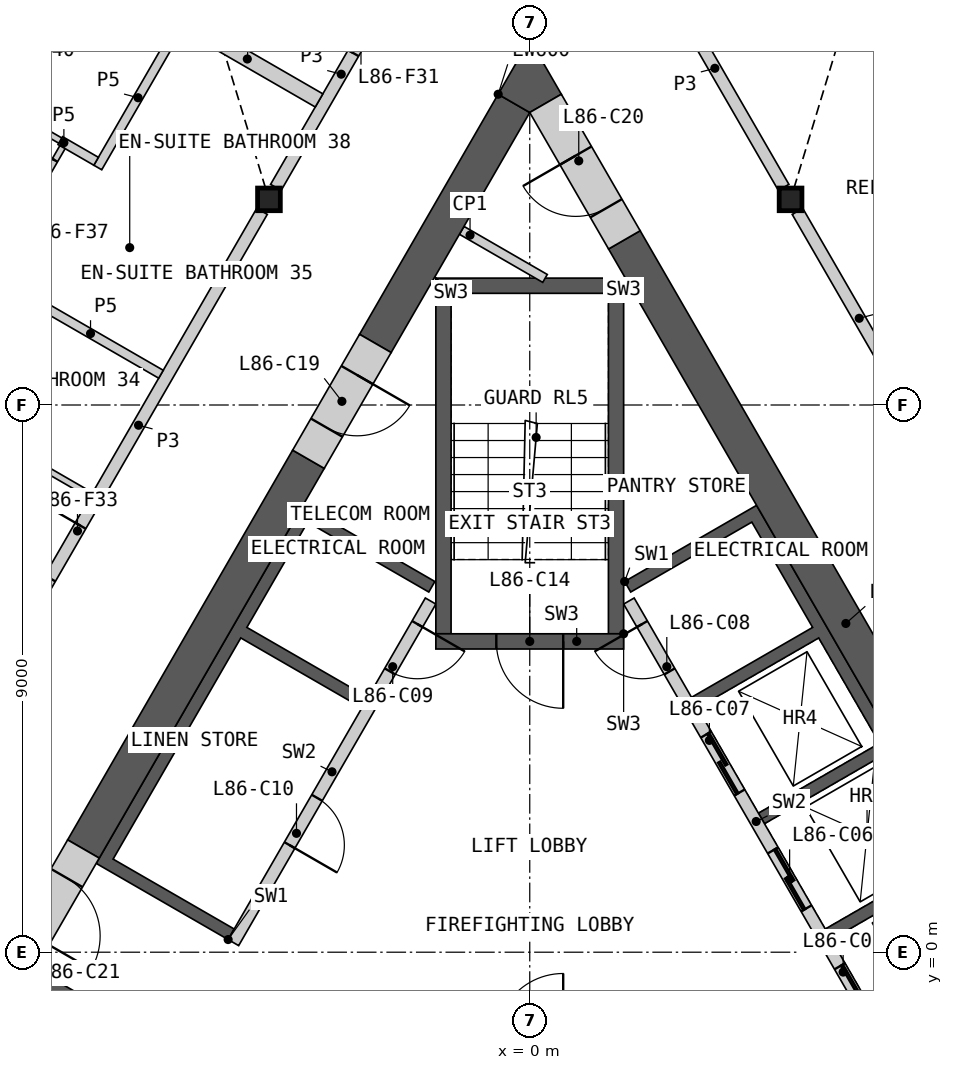
"""IFC4 building model, lengths in metres.
Left out: names, types, materials, properties, quantities, classifications, styles, units other than length and angle.
Written with IfcOpenShell. Run it as: python <this file> out.ifc"""

import sys

from ifc_helpers import new_model, si_unit, direction, frame, frame_2d, origin, origin_2d, place, context, subcontext, project, spatial, polyline, rectangle, i_section, outline, extrude, element, fill, save


model = new_model("IFC4")
c1 = context("Model", 3, precision=1e-05, world=origin(), true_north=direction((0.0, 1.0)))
c2 = subcontext(c1, "Body", "Model", "MODEL_VIEW")
j1 = project(units=[si_unit("LENGTHUNIT", "METRE"), si_unit("PLANEANGLEUNIT", "RADIAN")], contexts=[c1])
p1 = place(None, origin())
s1 = spatial("IfcSite", under=j1, at=p1, CompositionType="ELEMENT")
p2 = place(p1, origin())
s2 = spatial("IfcBuilding", under=s1, at=p2, CompositionType="ELEMENT")
p3 = place(p2, frame((0.0, 0.0, 381.4)))
s3 = spatial("IfcBuildingStorey", under=s2, at=p3, CompositionType="ELEMENT", Elevation=381.4)
for number, where, z_axis, x_axis in (
    (1, (-4.289, 12.382, 0.0), (0.0, 0.0, 1.0), (1.0, 0.0, 0.0)),
    (2, (4.289, 12.382, 0.0), (0.0, 0.0, 1.0), (1.0, 0.0, 0.0)),
):
    element("IfcColumn", number, at=place(p3, frame(where, z_axis=z_axis, x_axis=x_axis)), inside=s3, PredefinedType="COLUMN", context=c2, shape_type="SweptSolid", body=[
        extrude(i_section(OverallWidth=0.374, OverallDepth=0.372, WebThickness=0.016, FlangeThickness=0.026, at=origin_2d()), origin(), (0.0, 0.0, 1.0), 3.4),
    ])
p4 = place(p3, origin())
e3 = element("IfcWall", 3, at=p4, inside=s3, PredefinedType="SHEAR", context=c2, shape_type="SweptSolid", body=[
    extrude(outline(polyline([(1.561, 6.097), (3.731, 7.35), (8.231, -0.444), (6.061, -1.697), (5.96, -1.524), (7.952, -0.374), (6.952, 1.358), (4.96, 0.208), (4.861, 0.381), (6.852, 1.531), (5.852, 3.263), (3.861, 2.113), (3.76, 2.287), (5.752, 3.437), (4.752, 5.169), (2.76, 4.019), (2.66, 4.192), (4.652, 5.342), (3.652, 7.074), (1.66, 5.924), (1.561, 6.097)])), origin(), (0.0, 0.0, 1.0), 3.1),
])
p5 = place(p3, frame((5.817, -1.476, 0.0), z_axis=(0.0, 0.0, 1.0), x_axis=(-0.500002616675, 0.866023893041, 0.0)))
e4 = element("IfcWall", 4, at=p5, inside=s3, PredefinedType="SOLIDWALL", context=c2, shape_type="SweptSolid", body=[
    extrude(rectangle(XDim=8.373, YDim=0.2, at=frame_2d((4.187, 0.0))), origin(), (0.0, 0.0, 1.0), 3.1),
])
p6 = place(p5, frame((0.337, 0.0, 0.0)))
e5 = element("IfcOpeningElement", 5, at=p6, cuts=e4, PredefinedType="OPENING", context=c2, shape_type="SweptSolid", body=[
    extrude(rectangle(XDim=1.1, YDim=2.1, at=frame_2d((0.55, 1.05))), frame((0.0, 0.11, 0.0), z_axis=(0.0, -1.0, 0.0), x_axis=(1.0, 0.0, 0.0)), (0.0, 0.0, 1.0), 0.22),
])
p7 = place(p5, frame((2.537, 0.0, 0.0)))
e6 = element("IfcOpeningElement", 6, at=p7, cuts=e4, PredefinedType="OPENING", context=c2, shape_type="SweptSolid", body=[
    extrude(rectangle(XDim=1.1, YDim=2.1, at=frame_2d((0.55, 1.05))), frame((0.0, 0.11, 0.0), z_axis=(0.0, -1.0, 0.0), x_axis=(1.0, 0.0, 0.0)), (0.0, 0.0, 1.0), 0.22),
])
p8 = place(p5, frame((4.737, 0.0, 0.0)))
e7 = element("IfcOpeningElement", 7, at=p8, cuts=e4, PredefinedType="OPENING", context=c2, shape_type="SweptSolid", body=[
    extrude(rectangle(XDim=1.1, YDim=2.1, at=frame_2d((0.55, 1.05))), frame((0.0, 0.11, 0.0), z_axis=(0.0, -1.0, 0.0), x_axis=(1.0, 0.0, 0.0)), (0.0, 0.0, 1.0), 0.22),
])
p9 = place(p5, frame((7.037, 0.0, 0.0)))
e8 = element("IfcOpeningElement", 8, at=p9, cuts=e4, PredefinedType="OPENING", context=c2, shape_type="SweptSolid", body=[
    extrude(rectangle(XDim=0.9, YDim=2.1, at=frame_2d((0.45, 1.05))), frame((0.0, 0.11, 0.0), z_axis=(0.0, -1.0, 0.0), x_axis=(1.0, 0.0, 0.0)), (0.0, 0.0, 1.0), 0.22),
])
p10 = place(p3, origin())
e9 = element("IfcWall", 9, at=p10, inside=s3, PredefinedType="SHEAR", context=c2, shape_type="SweptSolid", body=[
    extrude(outline(polyline([(-6.061, -1.697), (-8.231, -0.444), (-8.131, -0.271), (-5.96, -1.524), (-6.061, -1.697)])), origin(), (0.0, 0.0, 1.0), 3.1),
])
p11 = place(p3, origin())
e10 = element("IfcWall", 10, at=p11, inside=s3, PredefinedType="SHEAR", context=c2, shape_type="SweptSolid", body=[
    extrude(outline(polyline([(-4.96, 0.208), (-7.131, 1.461), (-3.731, 7.35), (-1.561, 6.097), (-1.66, 5.924), (-3.652, 7.074), (-4.652, 5.342), (-2.66, 4.192), (-2.76, 4.019), (-4.752, 5.169), (-6.852, 1.531), (-4.861, 0.381), (-4.96, 0.208)])), origin(), (0.0, 0.0, 1.0), 3.1),
])
p12 = place(p3, frame((-1.631, 5.776, 0.0), z_axis=(0.0, 0.0, 1.0), x_axis=(-0.499992876559, -0.866029516466, 0.0)))
e11 = element("IfcWall", 11, at=p12, inside=s3, PredefinedType="SOLIDWALL", context=c2, shape_type="SweptSolid", body=[
    extrude(rectangle(XDim=6.486, YDim=0.2, at=frame_2d((3.243, 0.0))), origin(), (0.0, 0.0, 1.0), 3.1),
])
p13 = place(p12, frame((0.437, 0.0, 0.0)))
e12 = element("IfcOpeningElement", 12, at=p13, cuts=e11, PredefinedType="OPENING", context=c2, shape_type="SweptSolid", body=[
    extrude(rectangle(XDim=0.9, YDim=2.1, at=frame_2d((0.45, 1.05))), frame((0.0, 0.11, 0.0), z_axis=(0.0, -1.0, 0.0), x_axis=(1.0, 0.0, 0.0)), (0.0, 0.0, 1.0), 0.22),
])
p14 = place(p12, frame((3.737, 0.0, 0.0)))
e13 = element("IfcOpeningElement", 13, at=p14, cuts=e11, PredefinedType="OPENING", context=c2, shape_type="SweptSolid", body=[
    extrude(rectangle(XDim=0.9, YDim=2.1, at=frame_2d((0.45, 1.05))), frame((0.0, 0.11, 0.0), z_axis=(0.0, -1.0, 0.0), x_axis=(1.0, 0.0, 0.0)), (0.0, 0.0, 1.0), 0.22),
])
p15 = place(p3, origin())
e14 = element("IfcWall", 14, at=p15, inside=s3, PredefinedType="SHEAR", context=c2, shape_type="SweptSolid", body=[
    extrude(outline(polyline([(1.544, 5.237), (1.544, 11.087), (1.294, 10.837), (1.294, 5.237), (1.544, 5.237)])), origin(), (0.0, 0.0, 1.0), 3.1),
])
p16 = place(p3, origin())
e15 = element("IfcWall", 15, at=p16, inside=s3, PredefinedType="SHEAR", context=c2, shape_type="SweptSolid", body=[
    extrude(outline(polyline([(1.544, 11.087), (-1.544, 11.087), (-1.294, 10.837), (1.294, 10.837), (1.544, 11.087)])), origin(), (0.0, 0.0, 1.0), 3.1),
])
p17 = place(p3, origin())
e16 = element("IfcWall", 16, at=p17, inside=s3, PredefinedType="SHEAR", context=c2, shape_type="SweptSolid", body=[
    extrude(outline(polyline([(-1.294, 10.837), (-1.544, 11.087), (-1.544, 5.237), (-1.294, 5.237), (-1.294, 10.837)])), origin(), (0.0, 0.0, 1.0), 3.1),
])
p18 = place(p3, frame((1.544, 5.112, 0.0), z_axis=(0.0, 0.0, 1.0), x_axis=(-1.0, 0.0, 0.0)))
e17 = element("IfcWall", 17, at=p18, inside=s3, PredefinedType="SHEAR", context=c2, shape_type="SweptSolid", body=[
    extrude(rectangle(XDim=3.088, YDim=0.25, at=frame_2d((1.544, 0.0))), origin(), (0.0, 0.0, 1.0), 3.1),
])
p19 = place(p18, frame((0.994, 0.0, 0.0)))
e18 = element("IfcOpeningElement", 18, at=p19, cuts=e17, PredefinedType="OPENING", context=c2, shape_type="SweptSolid", body=[
    extrude(rectangle(XDim=1.1, YDim=2.1, at=frame_2d((0.55, 1.05))), frame((0.0, 0.135, 0.0), z_axis=(0.0, -1.0, 0.0), x_axis=(1.0, 0.0, 0.0)), (0.0, 0.0, 1.0), 0.27),
])
p20 = place(p3, frame((-1.119, 11.873, 0.0), z_axis=(0.0, 0.0, 1.0), x_axis=(0.865992812752, -0.500056445075, 0.0)))
e19 = element("IfcWall", 19, at=p20, inside=s3, PredefinedType="PARTITIONING", context=c2, shape_type="SweptSolid", body=[
    extrude(rectangle(XDim=1.582, YDim=0.15, at=frame_2d((0.791, 0.0))), origin(), (0.0, 0.0, 1.0), 3.1),
])
p21 = place(p3, frame((8.841, -0.902, 0.0), z_axis=(0.0, 0.0, 1.0), x_axis=(-0.499995618375, 0.866027933502, 0.0)))
e20 = element("IfcWall", 20, at=p21, inside=s3, PredefinedType="SHEAR", context=c2, shape_type="SweptSolid", body=[
    extrude(rectangle(XDim=14.571, YDim=0.6, at=frame_2d((7.285, 0.0))), origin(), (0.0, 0.0, 1.0), 3.1),
])
p22 = place(p3, frame((-3.639, 8.107, 0.0), z_axis=(0.0, 0.0, 1.0), x_axis=(-0.49999180351, -0.866030135978, 0.0)))
e21 = element("IfcWall", 21, at=p22, inside=s3, PredefinedType="SHEAR", context=c2, shape_type="SweptSolid", body=[
    extrude(rectangle(XDim=7.401, YDim=0.6, at=frame_2d((3.701, 0.0))), origin(), (0.0, 0.0, 1.0), 3.1),
])
p23 = place(p3, frame((-0.26, 13.961, 0.0), z_axis=(0.0, 0.0, 1.0), x_axis=(-0.499980485389, -0.866036670257, 0.0)))
e22 = element("IfcWall", 22, at=p23, inside=s3, PredefinedType="SHEAR", context=c2, shape_type="SweptSolid", body=[
    extrude(rectangle(XDim=4.559, YDim=0.6, at=frame_2d((2.28, 0.0))), origin(), (0.0, 0.0, 1.0), 3.1),
])
p24 = place(p3, origin())
e23 = element("IfcWall", 23, at=p24, inside=s3, PredefinedType="SHEAR", context=c2, shape_type="SweptSolid", body=[
    extrude(outline(polyline([(-0.52, 14.111), (0.0, 15.011), (0.52, 14.111), (0.0, 13.811), (-0.52, 14.111)])), origin(), (0.0, 0.0, 1.0), 3.1),
])
p25 = place(p3, frame((-2.539, 10.013, 0.0), z_axis=(0.0, 0.0, 1.0), x_axis=(-0.50002983664, -0.866008176907, 0.0)))
e24 = element("IfcWall", 24, at=p25, inside=s3, PredefinedType="SHEAR", context=c2, shape_type="SweptSolid", body=[
    extrude(rectangle(XDim=2.2, YDim=0.6, at=frame_2d((1.1, 0.0))), origin(), (0.0, 0.0, 1.0), 3.1),
])
p26 = place(p25, frame((0.6, 0.0, 0.0)))
e25 = element("IfcOpeningElement", 25, at=p26, cuts=e24, PredefinedType="OPENING", context=c2, shape_type="SweptSolid", body=[
    extrude(rectangle(XDim=1.0, YDim=2.1, at=frame_2d((0.5, 1.05))), frame((0.0, 0.31, 0.0), z_axis=(0.0, -1.0, 0.0), x_axis=(1.0, 0.0, 0.0)), (0.0, 0.0, 1.0), 0.62),
])
p27 = place(p3, frame((1.556, 11.716, 0.0), z_axis=(0.0, 0.0, 1.0), x_axis=(-0.500018667571, 0.866014625789, 0.0)))
e26 = element("IfcWall", 26, at=p27, inside=s3, PredefinedType="SHEAR", context=c2, shape_type="SweptSolid", body=[
    extrude(rectangle(XDim=2.592, YDim=0.6, at=frame_2d((1.296, 0.0))), origin(), (0.0, 0.0, 1.0), 3.1),
])
p28 = place(p27, frame((0.6, 0.0, 0.0)))
e27 = element("IfcOpeningElement", 27, at=p28, cuts=e26, PredefinedType="OPENING", context=c2, shape_type="SweptSolid", body=[
    extrude(rectangle(XDim=1.0, YDim=2.1, at=frame_2d((0.5, 1.05))), frame((0.0, 0.31, 0.0), z_axis=(0.0, -1.0, 0.0), x_axis=(1.0, 0.0, 0.0)), (0.0, 0.0, 1.0), 0.62),
])
p29 = place(p3, frame((-7.34, 1.698, 0.0), z_axis=(0.0, 0.0, 1.0), x_axis=(-0.50002983664, -0.866008176907, 0.0)))
e28 = element("IfcWall", 28, at=p29, inside=s3, PredefinedType="SHEAR", context=c2, shape_type="SweptSolid", body=[
    extrude(rectangle(XDim=2.2, YDim=0.6, at=frame_2d((1.1, 0.0))), origin(), (0.0, 0.0, 1.0), 3.1),
])
p30 = place(p29, frame((0.55, 0.0, 0.0)))
e29 = element("IfcOpeningElement", 29, at=p30, cuts=e28, PredefinedType="OPENING", context=c2, shape_type="SweptSolid", body=[
    extrude(rectangle(XDim=1.1, YDim=2.1, at=frame_2d((0.55, 1.05))), frame((0.0, 0.31, 0.0), z_axis=(0.0, -1.0, 0.0), x_axis=(1.0, 0.0, 0.0)), (0.0, 0.0, 1.0), 0.62),
])
p31 = place(p3, frame((4.403, 12.185, 0.0), z_axis=(0.0, 0.0, 1.0), x_axis=(0.499992155518, -0.866029932751, 0.0)))
e30 = element("IfcWall", 30, at=p31, inside=s3, PredefinedType="PARTITIONING", context=c2, shape_type="SweptSolid", body=[
    extrude(rectangle(XDim=8.123, YDim=0.2, at=frame_2d((4.062, 0.0))), origin(), (0.0, 0.0, 1.0), 3.1),
])
p32 = place(p31, frame((3.587, 0.0, 0.0)))
e31 = element("IfcOpeningElement", 31, at=p32, cuts=e30, PredefinedType="OPENING", context=c2, shape_type="SweptSolid", body=[
    extrude(rectangle(XDim=0.95, YDim=2.1, at=frame_2d((0.475, 1.05))), frame((0.0, 0.11, 0.0), z_axis=(0.0, -1.0, 0.0), x_axis=(1.0, 0.0, 0.0)), (0.0, 0.0, 1.0), 0.22),
])
p33 = place(p3, frame((-8.465, 5.15, 0.0), z_axis=(0.0, 0.0, 1.0), x_axis=(0.499992155518, 0.866029932751, 0.0)))
e32 = element("IfcWall", 32, at=p33, inside=s3, PredefinedType="PARTITIONING", context=c2, shape_type="SweptSolid", body=[
    extrude(rectangle(XDim=8.123, YDim=0.2, at=frame_2d((4.062, 0.0))), origin(), (0.0, 0.0, 1.0), 3.1),
])
p34 = place(p33, frame((1.153, 0.0, 0.0)))
e33 = element("IfcOpeningElement", 33, at=p34, cuts=e32, PredefinedType="OPENING", context=c2, shape_type="SweptSolid", body=[
    extrude(rectangle(XDim=1.0, YDim=2.1, at=frame_2d((0.5, 1.05))), frame((0.0, 0.11, 0.0), z_axis=(0.0, -1.0, 0.0), x_axis=(1.0, 0.0, 0.0)), (0.0, 0.0, 1.0), 0.22),
])
p35 = place(p3, frame((1.913, 16.498, 0.0), z_axis=(0.0, 0.0, 1.0), x_axis=(0.499974648164, -0.866040040179, 0.0)))
e34 = element("IfcWall", 34, at=p35, inside=s3, PredefinedType="PARTITIONING", context=c2, shape_type="SweptSolid", body=[
    extrude(rectangle(XDim=4.525, YDim=0.2, at=frame_2d((2.263, 0.0))), origin(), (0.0, 0.0, 1.0), 3.1),
])
p36 = place(p3, frame((-4.176, 12.579, 0.0), z_axis=(0.0, 0.0, 1.0), x_axis=(0.500004215162, 0.866022970146, 0.0)))
e35 = element("IfcWall", 35, at=p36, inside=s3, PredefinedType="PARTITIONING", context=c2, shape_type="SweptSolid", body=[
    extrude(rectangle(XDim=4.3, YDim=0.2, at=frame_2d((2.15, 0.0))), origin(), (0.0, 0.0, 1.0), 3.1),
])
p37 = place(p36, frame((2.55, 0.0, 0.0)))
e36 = element("IfcOpeningElement", 36, at=p37, cuts=e35, PredefinedType="OPENING", context=c2, shape_type="SweptSolid", body=[
    extrude(rectangle(XDim=1.0, YDim=2.1, at=frame_2d((0.5, 1.05))), frame((0.0, 0.11, 0.0), z_axis=(0.0, -1.0, 0.0), x_axis=(1.0, 0.0, 0.0)), (0.0, 0.0, 1.0), 0.22),
])
p38 = place(p3, frame((-5.825, 15.372, 0.0), z_axis=(0.0, 0.0, 1.0), x_axis=(0.866051307416, -0.49995513091, 0.0)))
e37 = element("IfcWall", 37, at=p38, inside=s3, PredefinedType="PARTITIONING", context=c2, shape_type="SweptSolid", body=[
    extrude(rectangle(XDim=2.725, YDim=0.25, at=frame_2d((1.362, 0.0))), origin(), (0.0, 0.0, 1.0), 2.33),
])
p39 = place(p3, frame((3.926, 19.811, 0.0), z_axis=(0.0, 0.0, 1.0), x_axis=(0.500001082559, -0.866024778768, 0.0)))
e38 = element("IfcWall", 38, at=p39, inside=s3, PredefinedType="PARTITIONING", context=c2, shape_type="SweptSolid", body=[
    extrude(rectangle(XDim=15.094, YDim=0.2, at=frame_2d((7.547, 0.0))), origin(), (0.0, 0.0, 1.0), 2.33),
])
p40 = place(p39, frame((3.761, 0.0, 0.0)))
e39 = element("IfcOpeningElement", 39, at=p40, cuts=e38, PredefinedType="OPENING", context=c2, shape_type="SweptSolid", body=[
    extrude(rectangle(XDim=0.95, YDim=2.1, at=frame_2d((0.475, 1.05))), frame((0.0, 0.11, 0.0), z_axis=(0.0, -1.0, 0.0), x_axis=(1.0, 0.0, 0.0)), (0.0, 0.0, 1.0), 0.22),
])
p41 = place(p3, frame((-8.382, 10.844, 0.0), z_axis=(0.0, 0.0, 1.0), x_axis=(0.866021425885, -0.500006889861, 0.0)))
e40 = element("IfcWall", 40, at=p41, inside=s3, PredefinedType="PLUMBINGWALL", context=c2, shape_type="SweptSolid", body=[
    extrude(rectangle(XDim=2.675, YDim=0.15, at=frame_2d((1.337, 0.0))), origin(), (0.0, 0.0, 1.0), 2.33),
])
p42 = place(p3, frame((-7.104, 12.906, 0.0), z_axis=(0.0, 0.0, 1.0), x_axis=(0.499993606316, 0.866029095148, 0.0)))
e41 = element("IfcWall", 41, at=p42, inside=s3, PredefinedType="PLUMBINGWALL", context=c2, shape_type="SweptSolid", body=[
    extrude(rectangle(XDim=2.65, YDim=0.15, at=frame_2d((1.325, 0.0))), origin(), (0.0, 0.0, 1.0), 2.33),
])
p43 = place(p3, frame((-7.72, 13.349, 0.0), z_axis=(0.0, 0.0, 1.0), x_axis=(0.866113839764, -0.499846793097, 0.0)))
e42 = element("IfcWall", 42, at=p43, inside=s3, PredefinedType="PLUMBINGWALL", context=c2, shape_type="SweptSolid", body=[
    extrude(rectangle(XDim=0.68, YDim=0.15, at=frame_2d((0.34, 0.0))), origin(), (0.0, 0.0, 1.0), 2.33),
])
p44 = place(p3, frame((-9.517, 14.328, 0.0), z_axis=(0.0, 0.0, 1.0), x_axis=(0.499996545922, 0.866027397988, 0.0)))
e43 = element("IfcWall", 43, at=p44, inside=s3, PredefinedType="PARTITIONING", context=c2, shape_type="SweptSolid", body=[
    extrude(rectangle(XDim=5.5, YDim=0.1, at=frame_2d((2.75, 0.0))), origin(), (0.0, 0.0, 1.0), 2.33),
])
p45 = place(p44, frame((4.3, 0.0, 0.0)))
e44 = element("IfcOpeningElement", 44, at=p45, cuts=e43, PredefinedType="OPENING", context=c2, shape_type="SweptSolid", body=[
    extrude(rectangle(XDim=0.95, YDim=2.1, at=frame_2d((0.475, 1.05))), frame((0.0, 0.06, 0.0), z_axis=(0.0, -1.0, 0.0), x_axis=(1.0, 0.0, 0.0)), (0.0, 0.0, 1.0), 0.12),
])
p46 = place(p44, frame((0.25, 0.0, 0.0)))
e45 = element("IfcOpeningElement", 45, at=p46, cuts=e43, PredefinedType="OPENING", context=c2, shape_type="SweptSolid", body=[
    extrude(rectangle(XDim=0.95, YDim=2.1, at=frame_2d((0.475, 1.05))), frame((0.0, 0.06, 0.0), z_axis=(0.0, -1.0, 0.0), x_axis=(1.0, 0.0, 0.0)), (0.0, 0.0, 1.0), 0.12),
])
p47 = place(p3, frame((-9.51, 8.839, 0.0), z_axis=(0.0, 0.0, 1.0), x_axis=(0.866029095148, -0.499993606316, 0.0)))
e46 = element("IfcWall", 46, at=p47, inside=s3, PredefinedType="PARTITIONING", context=c2, shape_type="SweptSolid", body=[
    extrude(rectangle(XDim=2.65, YDim=0.1, at=frame_2d((1.325, 0.0))), origin(), (0.0, 0.0, 1.0), 2.33),
])
p48 = place(p3, frame((-8.872, 11.184, 0.0), z_axis=(0.0, 0.0, 1.0), x_axis=(0.499986429846, 0.866033238375, 0.0)))
e47 = element("IfcWall", 47, at=p48, inside=s3, PredefinedType="PARTITIONING", context=c2, shape_type="SweptSolid", body=[
    extrude(rectangle(XDim=2.375, YDim=0.1, at=frame_2d((1.188, 0.0))), origin(), (0.0, 0.0, 1.0), 2.33),
])
p49 = place(p48, frame((1.175, 0.0, 0.0)))
e48 = element("IfcOpeningElement", 48, at=p49, cuts=e47, PredefinedType="OPENING", context=c2, shape_type="SweptSolid", body=[
    extrude(rectangle(XDim=0.95, YDim=2.1, at=frame_2d((0.475, 1.05))), frame((0.0, 0.06, 0.0), z_axis=(0.0, -1.0, 0.0), x_axis=(1.0, 0.0, 0.0)), (0.0, 0.0, 1.0), 0.12),
])
p50 = place(p3, frame((-9.448, 14.346, 0.0), z_axis=(0.0, 0.0, 1.0), x_axis=(0.866020521143, -0.500008456887, 0.0)))
e49 = element("IfcWall", 49, at=p50, inside=s3, PredefinedType="PARTITIONING", context=c2, shape_type="SweptSolid", body=[
    extrude(rectangle(XDim=1.995, YDim=0.1, at=frame_2d((0.998, 0.0))), origin(), (0.0, 0.0, 1.0), 2.33),
])
p51 = place(p6, origin())
e50 = element("IfcDoor", 50, at=p51, inside=s3, OperationType="SLIDING_TO_LEFT", PredefinedType="DOOR", context=c2, shape_type="SweptSolid", body=[
    extrude(rectangle(XDim=1.1, YDim=2.1, at=frame_2d((0.55, 1.05))), frame((0.0, 0.025, 0.0), z_axis=(0.0, -1.0, 0.0), x_axis=(1.0, 0.0, 0.0)), (0.0, 0.0, 1.0), 0.05),
])
fill(e5, e50)
p52 = place(p7, origin())
e51 = element("IfcDoor", 51, at=p52, inside=s3, OperationType="SLIDING_TO_LEFT", PredefinedType="DOOR", context=c2, shape_type="SweptSolid", body=[
    extrude(rectangle(XDim=1.1, YDim=2.1, at=frame_2d((0.55, 1.05))), frame((0.0, 0.025, 0.0), z_axis=(0.0, -1.0, 0.0), x_axis=(1.0, 0.0, 0.0)), (0.0, 0.0, 1.0), 0.05),
])
fill(e6, e51)
p53 = place(p8, origin())
e52 = element("IfcDoor", 52, at=p53, inside=s3, OperationType="SLIDING_TO_LEFT", PredefinedType="DOOR", context=c2, shape_type="SweptSolid", body=[
    extrude(rectangle(XDim=1.1, YDim=2.1, at=frame_2d((0.55, 1.05))), frame((0.0, 0.025, 0.0), z_axis=(0.0, -1.0, 0.0), x_axis=(1.0, 0.0, 0.0)), (0.0, 0.0, 1.0), 0.05),
])
fill(e7, e52)
p54 = place(p9, origin())
e53 = element("IfcDoor", 53, at=p54, inside=s3, OperationType="SINGLE_SWING_RIGHT", PredefinedType="DOOR", context=c2, shape_type="SweptSolid", body=[
    extrude(rectangle(XDim=0.9, YDim=2.1, at=frame_2d((0.45, 1.05))), frame((0.0, 0.025, 0.0), z_axis=(0.0, -1.0, 0.0), x_axis=(1.0, 0.0, 0.0)), (0.0, 0.0, 1.0), 0.05),
])
fill(e8, e53)
p55 = place(p13, origin())
e54 = element("IfcDoor", 54, at=p55, inside=s3, OperationType="SINGLE_SWING_LEFT", PredefinedType="DOOR", context=c2, shape_type="SweptSolid", body=[
    extrude(rectangle(XDim=0.9, YDim=2.1, at=frame_2d((0.45, 1.05))), frame((0.0, 0.025, 0.0), z_axis=(0.0, -1.0, 0.0), x_axis=(1.0, 0.0, 0.0)), (0.0, 0.0, 1.0), 0.05),
])
fill(e12, e54)
p56 = place(p14, origin())
e55 = element("IfcDoor", 55, at=p56, inside=s3, OperationType="SINGLE_SWING_RIGHT", PredefinedType="DOOR", context=c2, shape_type="SweptSolid", body=[
    extrude(rectangle(XDim=0.9, YDim=2.1, at=frame_2d((0.45, 1.05))), frame((0.0, 0.025, 0.0), z_axis=(0.0, -1.0, 0.0), x_axis=(1.0, 0.0, 0.0)), (0.0, 0.0, 1.0), 0.05),
])
fill(e13, e55)
p57 = place(p19, origin())
e56 = element("IfcDoor", 56, at=p57, inside=s3, OperationType="SINGLE_SWING_LEFT", PredefinedType="DOOR", context=c2, shape_type="SweptSolid", body=[
    extrude(rectangle(XDim=1.1, YDim=2.1, at=frame_2d((0.55, 1.05))), frame((0.0, 0.025, 0.0), z_axis=(0.0, -1.0, 0.0), x_axis=(1.0, 0.0, 0.0)), (0.0, 0.0, 1.0), 0.05),
])
fill(e18, e56)
p58 = place(p26, origin())
e57 = element("IfcDoor", 57, at=p58, inside=s3, OperationType="SINGLE_SWING_LEFT", PredefinedType="DOOR", context=c2, shape_type="SweptSolid", body=[
    extrude(rectangle(XDim=1.0, YDim=2.1, at=frame_2d((0.5, 1.05))), frame((0.0, 0.055, 0.0), z_axis=(0.0, -1.0, 0.0), x_axis=(1.0, 0.0, 0.0)), (0.0, 0.0, 1.0), 0.05),
])
fill(e25, e57)
p59 = place(p28, origin())
e58 = element("IfcDoor", 58, at=p59, inside=s3, OperationType="SINGLE_SWING_RIGHT", PredefinedType="DOOR", context=c2, shape_type="SweptSolid", body=[
    extrude(rectangle(XDim=1.0, YDim=2.1, at=frame_2d((0.5, 1.05))), frame((0.0, 0.055, 0.0), z_axis=(0.0, -1.0, 0.0), x_axis=(1.0, 0.0, 0.0)), (0.0, 0.0, 1.0), 0.05),
])
fill(e27, e58)
p60 = place(p30, origin())
e59 = element("IfcDoor", 59, at=p60, inside=s3, OperationType="SINGLE_SWING_RIGHT", PredefinedType="DOOR", context=c2, shape_type="SweptSolid", body=[
    extrude(rectangle(XDim=1.1, YDim=2.1, at=frame_2d((0.55, 1.05))), frame((0.0, 0.055, 0.0), z_axis=(0.0, -1.0, 0.0), x_axis=(1.0, 0.0, 0.0)), (0.0, 0.0, 1.0), 0.05),
])
fill(e29, e59)
p61 = place(p37, origin())
e60 = element("IfcDoor", 60, at=p61, inside=s3, OperationType="SINGLE_SWING_LEFT", PredefinedType="DOOR", context=c2, shape_type="SweptSolid", body=[
    extrude(rectangle(XDim=1.0, YDim=2.1, at=frame_2d((0.5, 1.05))), frame((0.0, 0.025, 0.0), z_axis=(0.0, -1.0, 0.0), x_axis=(1.0, 0.0, 0.0)), (0.0, 0.0, 1.0), 0.05),
])
fill(e36, e60)
p62 = place(p34, origin())
e61 = element("IfcDoor", 61, at=p62, inside=s3, OperationType="SINGLE_SWING_RIGHT", PredefinedType="DOOR", context=c2, shape_type="SweptSolid", body=[
    extrude(rectangle(XDim=1.0, YDim=2.1, at=frame_2d((0.5, 1.05))), frame((0.0, 0.025, 0.0), z_axis=(0.0, -1.0, 0.0), x_axis=(1.0, 0.0, 0.0)), (0.0, 0.0, 1.0), 0.05),
])
fill(e33, e61)
p63 = place(p49, origin())
e62 = element("IfcDoor", 62, at=p63, inside=s3, OperationType="SINGLE_SWING_RIGHT", PredefinedType="DOOR", context=c2, shape_type="SweptSolid", body=[
    extrude(rectangle(XDim=0.95, YDim=2.1, at=frame_2d((0.475, 1.05))), frame((0.0, 0.025, 0.0), z_axis=(0.0, -1.0, 0.0), x_axis=(1.0, 0.0, 0.0)), (0.0, 0.0, 1.0), 0.05),
])
fill(e48, e62)
save(model, sys.argv[1])
